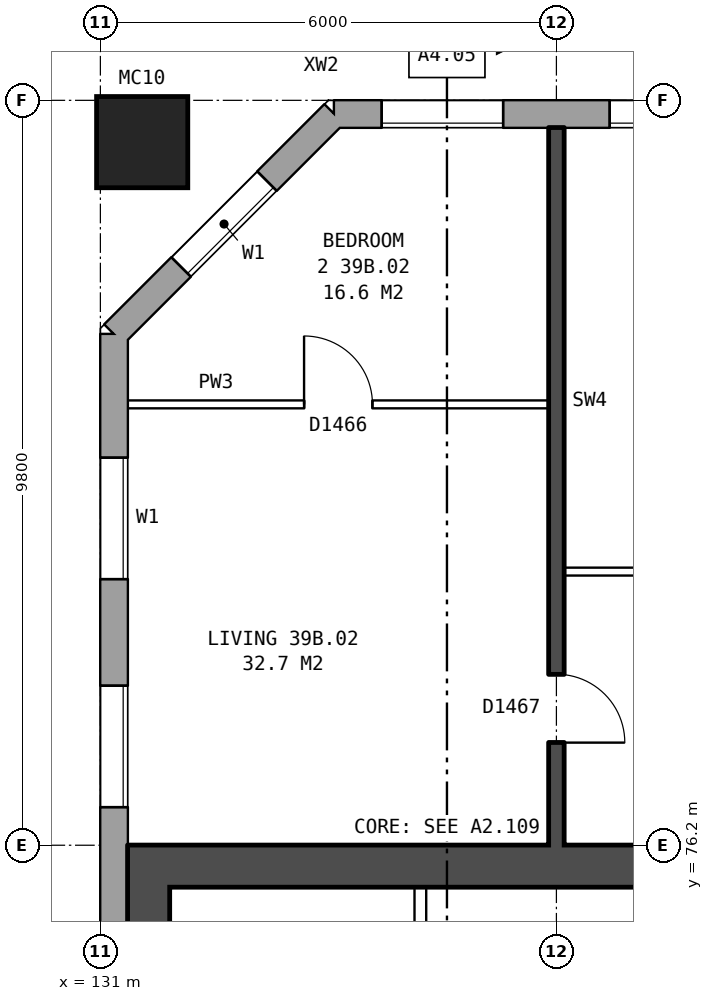
"""IFC4 building model, lengths in metres.
Left out: names, types, materials, properties, quantities, classifications, styles, units other than length and angle.
Written with IfcOpenShell. Run it as: python <this file> out.ifc"""

import sys

from ifc_helpers import new_model, si_unit, direction, frame, frame_2d, origin, origin_2d, place, context, subcontext, project, spatial, rectangle, hollow_rectangle, extrude, element, fill, save


model = new_model("IFC4")
c1 = context("Model", 3, precision=1e-05, world=origin(), true_north=direction((0.0, 1.0)))
c2 = subcontext(c1, "Body", "Model", "MODEL_VIEW")
j1 = project(units=[si_unit("LENGTHUNIT", "METRE"), si_unit("PLANEANGLEUNIT", "RADIAN")], contexts=[c1])
p1 = place(None, origin())
s1 = spatial("IfcSite", under=j1, at=p1, CompositionType="ELEMENT")
p2 = place(p1, origin())
s2 = spatial("IfcBuilding", under=s1, at=p2, CompositionType="ELEMENT")
p3 = place(p2, frame((0.0, 0.0, 139.2)))
s3 = spatial("IfcBuildingStorey", under=s2, at=p3, CompositionType="ELEMENT", Elevation=139.2)
p4 = place(p3, frame((131.55, 85.45, 0.0), z_axis=(0.0, 0.0, 1.0), x_axis=(1.0, 0.0, 0.0)))
e1 = element("IfcColumn", 1, at=p4, inside=s3, PredefinedType="COLUMN", context=c2, shape_type="SweptSolid", body=[
    extrude(hollow_rectangle(XDim=1.2, YDim=1.2, WallThickness=0.065, at=origin_2d()), origin(), (0.0, 0.0, 1.0), 3.1),
])
p5 = place(p3, frame((169.675, 85.82, 0.0), z_axis=(0.0, 0.0, 1.0), x_axis=(-1.0, 0.0, 0.0)))
e2 = element("IfcWall", 2, at=p5, inside=s3, PredefinedType="STANDARD", context=c2, shape_type="SweptSolid", body=[
    extrude(rectangle(XDim=35.601, YDim=0.36, at=frame_2d((17.8, 0.0))), origin(), (0.0, 0.0, 1.0), 2.85),
])
p6 = place(p5, frame((0.375, 0.0, 0.8)))
e3 = element("IfcOpeningElement", 3, at=p6, cuts=e2, PredefinedType="OPENING", context=c2, shape_type="SweptSolid", body=[
    extrude(rectangle(XDim=1.6, YDim=1.8, at=frame_2d((0.8, 0.9))), frame((0.0, 0.19, 0.0), z_axis=(0.0, -1.0, 0.0), x_axis=(1.0, 0.0, 0.0)), (0.0, 0.0, 1.0), 0.38),
])
p7 = place(p5, frame((3.375, 0.0, 0.8)))
e4 = element("IfcOpeningElement", 4, at=p7, cuts=e2, PredefinedType="OPENING", context=c2, shape_type="SweptSolid", body=[
    extrude(rectangle(XDim=1.6, YDim=1.8, at=frame_2d((0.8, 0.9))), frame((0.0, 0.19, 0.0), z_axis=(0.0, -1.0, 0.0), x_axis=(1.0, 0.0, 0.0)), (0.0, 0.0, 1.0), 0.38),
])
p8 = place(p5, frame((6.375, 0.0, 0.8)))
e5 = element("IfcOpeningElement", 5, at=p8, cuts=e2, PredefinedType="OPENING", context=c2, shape_type="SweptSolid", body=[
    extrude(rectangle(XDim=1.6, YDim=1.8, at=frame_2d((0.8, 0.9))), frame((0.0, 0.19, 0.0), z_axis=(0.0, -1.0, 0.0), x_axis=(1.0, 0.0, 0.0)), (0.0, 0.0, 1.0), 0.38),
])
p9 = place(p5, frame((9.375, 0.0, 0.8)))
e6 = element("IfcOpeningElement", 6, at=p9, cuts=e2, PredefinedType="OPENING", context=c2, shape_type="SweptSolid", body=[
    extrude(rectangle(XDim=1.6, YDim=1.8, at=frame_2d((0.8, 0.9))), frame((0.0, 0.19, 0.0), z_axis=(0.0, -1.0, 0.0), x_axis=(1.0, 0.0, 0.0)), (0.0, 0.0, 1.0), 0.38),
])
p10 = place(p5, frame((12.375, 0.0, 0.8)))
e7 = element("IfcOpeningElement", 7, at=p10, cuts=e2, PredefinedType="OPENING", context=c2, shape_type="SweptSolid", body=[
    extrude(rectangle(XDim=1.6, YDim=1.8, at=frame_2d((0.8, 0.9))), frame((0.0, 0.19, 0.0), z_axis=(0.0, -1.0, 0.0), x_axis=(1.0, 0.0, 0.0)), (0.0, 0.0, 1.0), 0.38),
])
p11 = place(p5, frame((14.875, 0.0, 1.65)))
e8 = element("IfcOpeningElement", 8, at=p11, cuts=e2, PredefinedType="OPENING", context=c2, shape_type="SweptSolid", body=[
    extrude(rectangle(XDim=1.4, YDim=0.9, at=frame_2d((0.7, 0.45))), frame((0.0, 0.19, 0.0), z_axis=(0.0, -1.0, 0.0), x_axis=(1.0, 0.0, 0.0)), (0.0, 0.0, 1.0), 0.38),
])
p12 = place(p5, frame((17.825, 0.0, 0.25)))
e9 = element("IfcOpeningElement", 9, at=p12, cuts=e2, PredefinedType="OPENING", context=c2, shape_type="SweptSolid", body=[
    extrude(rectangle(XDim=0.6, YDim=1.2, at=frame_2d((0.3, 0.6))), frame((0.0, 0.19, 0.0), z_axis=(0.0, -1.0, 0.0), x_axis=(1.0, 0.0, 0.0)), (0.0, 0.0, 1.0), 0.38),
])
p13 = place(p5, frame((21.375, 0.0, 0.8)))
e10 = element("IfcOpeningElement", 10, at=p13, cuts=e2, PredefinedType="OPENING", context=c2, shape_type="SweptSolid", body=[
    extrude(rectangle(XDim=1.6, YDim=1.8, at=frame_2d((0.8, 0.9))), frame((0.0, 0.19, 0.0), z_axis=(0.0, -1.0, 0.0), x_axis=(1.0, 0.0, 0.0)), (0.0, 0.0, 1.0), 0.38),
])
p14 = place(p5, frame((24.375, 0.0, 0.8)))
e11 = element("IfcOpeningElement", 11, at=p14, cuts=e2, PredefinedType="OPENING", context=c2, shape_type="SweptSolid", body=[
    extrude(rectangle(XDim=1.6, YDim=1.8, at=frame_2d((0.8, 0.9))), frame((0.0, 0.19, 0.0), z_axis=(0.0, -1.0, 0.0), x_axis=(1.0, 0.0, 0.0)), (0.0, 0.0, 1.0), 0.38),
])
p15 = place(p5, frame((27.375, 0.0, 0.8)))
e12 = element("IfcOpeningElement", 12, at=p15, cuts=e2, PredefinedType="OPENING", context=c2, shape_type="SweptSolid", body=[
    extrude(rectangle(XDim=1.6, YDim=1.8, at=frame_2d((0.8, 0.9))), frame((0.0, 0.19, 0.0), z_axis=(0.0, -1.0, 0.0), x_axis=(1.0, 0.0, 0.0)), (0.0, 0.0, 1.0), 0.38),
])
p16 = place(p5, frame((30.375, 0.0, 0.8)))
e13 = element("IfcOpeningElement", 13, at=p16, cuts=e2, PredefinedType="OPENING", context=c2, shape_type="SweptSolid", body=[
    extrude(rectangle(XDim=1.6, YDim=1.8, at=frame_2d((0.8, 0.9))), frame((0.0, 0.19, 0.0), z_axis=(0.0, -1.0, 0.0), x_axis=(1.0, 0.0, 0.0)), (0.0, 0.0, 1.0), 0.38),
])
p17 = place(p5, frame((33.375, 0.0, 0.8)))
e14 = element("IfcOpeningElement", 14, at=p17, cuts=e2, PredefinedType="OPENING", context=c2, shape_type="SweptSolid", body=[
    extrude(rectangle(XDim=1.6, YDim=1.8, at=frame_2d((0.8, 0.9))), frame((0.0, 0.19, 0.0), z_axis=(0.0, -1.0, 0.0), x_axis=(1.0, 0.0, 0.0)), (0.0, 0.0, 1.0), 0.38),
])
p18 = place(p5, frame((16.825, 0.0, 0.15)))
e15 = element("IfcOpeningElement", 15, at=p18, cuts=e2, PredefinedType="OPENING", context=c2, shape_type="SweptSolid", body=[
    extrude(rectangle(XDim=0.6, YDim=0.9, at=frame_2d((0.3, 0.45))), frame((0.0, 0.19, 0.0), z_axis=(0.0, -1.0, 0.0), x_axis=(1.0, 0.0, 0.0)), (0.0, 0.0, 1.0), 0.38),
])
p19 = place(p5, frame((19.575, 0.0, 1.35)))
e16 = element("IfcOpeningElement", 16, at=p19, cuts=e2, PredefinedType="OPENING", context=c2, shape_type="SweptSolid", body=[
    extrude(rectangle(XDim=0.8, YDim=1.2, at=frame_2d((0.4, 0.6))), frame((0.0, 0.19, 0.0), z_axis=(0.0, -1.0, 0.0), x_axis=(1.0, 0.0, 0.0)), (0.0, 0.0, 1.0), 0.38),
])
p20 = place(p3, frame((134.075, 85.82, 0.0), z_axis=(0.0, 0.0, 1.0), x_axis=(-0.707106781187, -0.707106781187, 0.0)))
e17 = element("IfcWall", 17, at=p20, inside=s3, PredefinedType="STANDARD", context=c2, shape_type="SweptSolid", body=[
    extrude(rectangle(XDim=4.094, YDim=0.36, at=frame_2d((2.047, 0.0))), origin(), (0.0, 0.0, 1.0), 2.85),
])
p21 = place(p20, frame((1.247, 0.0, 0.8)))
e18 = element("IfcOpeningElement", 18, at=p21, cuts=e17, PredefinedType="OPENING", context=c2, shape_type="SweptSolid", body=[
    extrude(rectangle(XDim=1.6, YDim=1.8, at=frame_2d((0.8, 0.9))), frame((0.0, 0.19, 0.0), z_axis=(0.0, -1.0, 0.0), x_axis=(1.0, 0.0, 0.0)), (0.0, 0.0, 1.0), 0.38),
])
p22 = place(p3, frame((131.18, 82.925, 0.0), z_axis=(0.0, 0.0, 1.0), x_axis=(0.0, -1.0, 0.0)))
e19 = element("IfcWall", 19, at=p22, inside=s3, PredefinedType="STANDARD", context=c2, shape_type="SweptSolid", body=[
    extrude(rectangle(XDim=25.851, YDim=0.36, at=frame_2d((12.925, 0.0))), origin(), (0.0, 0.0, 1.0), 2.85),
])
p23 = place(p22, frame((1.625, 0.0, 0.8)))
e20 = element("IfcOpeningElement", 20, at=p23, cuts=e19, PredefinedType="OPENING", context=c2, shape_type="SweptSolid", body=[
    extrude(rectangle(XDim=1.6, YDim=1.8, at=frame_2d((0.8, 0.9))), frame((0.0, 0.19, 0.0), z_axis=(0.0, -1.0, 0.0), x_axis=(1.0, 0.0, 0.0)), (0.0, 0.0, 1.0), 0.38),
])
p24 = place(p22, frame((4.625, 0.0, 0.8)))
e21 = element("IfcOpeningElement", 21, at=p24, cuts=e19, PredefinedType="OPENING", context=c2, shape_type="SweptSolid", body=[
    extrude(rectangle(XDim=1.6, YDim=1.8, at=frame_2d((0.8, 0.9))), frame((0.0, 0.19, 0.0), z_axis=(0.0, -1.0, 0.0), x_axis=(1.0, 0.0, 0.0)), (0.0, 0.0, 1.0), 0.38),
])
p25 = place(p22, frame((19.625, 0.0, 0.8)))
e22 = element("IfcOpeningElement", 22, at=p25, cuts=e19, PredefinedType="OPENING", context=c2, shape_type="SweptSolid", body=[
    extrude(rectangle(XDim=1.6, YDim=1.8, at=frame_2d((0.8, 0.9))), frame((0.0, 0.19, 0.0), z_axis=(0.0, -1.0, 0.0), x_axis=(1.0, 0.0, 0.0)), (0.0, 0.0, 1.0), 0.38),
])
p26 = place(p22, frame((22.625, 0.0, 0.8)))
e23 = element("IfcOpeningElement", 23, at=p26, cuts=e19, PredefinedType="OPENING", context=c2, shape_type="SweptSolid", body=[
    extrude(rectangle(XDim=1.6, YDim=1.8, at=frame_2d((0.8, 0.9))), frame((0.0, 0.19, 0.0), z_axis=(0.0, -1.0, 0.0), x_axis=(1.0, 0.0, 0.0)), (0.0, 0.0, 1.0), 0.38),
])
p27 = place(p3, frame((131.635, 63.8, 0.0), z_axis=(0.0, 0.0, 1.0), x_axis=(0.0, 1.0, 0.0)))
e24 = element("IfcWall", 24, at=p27, inside=s3, PredefinedType="SHEAR", context=c2, shape_type="SweptSolid", body=[
    extrude(rectangle(XDim=12.4, YDim=0.55, at=frame_2d((6.2, 0.0))), origin(), (0.0, 0.0, 1.0), 2.85),
])
p28 = place(p3, frame((139.21, 75.925, 0.0), z_axis=(0.0, 0.0, 1.0), x_axis=(-1.0, 0.0, 0.0)))
e25 = element("IfcWall", 25, at=p28, inside=s3, PredefinedType="SHEAR", context=c2, shape_type="SweptSolid", body=[
    extrude(rectangle(XDim=7.3, YDim=0.55, at=frame_2d((3.65, 0.0))), origin(), (0.0, 0.0, 1.0), 2.85),
])
p29 = place(p3, frame((135.21, 71.375, 0.0), z_axis=(0.0, 0.0, 1.0), x_axis=(0.0, 1.0, 0.0)))
e26 = element("IfcWall", 26, at=p29, inside=s3, PredefinedType="PARTITIONING", context=c2, shape_type="SweptSolid", body=[
    extrude(rectangle(XDim=4.275, YDim=0.15, at=frame_2d((2.137, 0.0))), origin(), (0.0, 0.0, 1.0), 2.85),
])
p30 = place(p29, frame((2.625, 0.0, 0.0)))
e27 = element("IfcOpeningElement", 27, at=p30, cuts=e26, PredefinedType="OPENING", context=c2, shape_type="SweptSolid", body=[
    extrude(rectangle(XDim=1.1, YDim=2.1, at=frame_2d((0.55, 1.05))), frame((0.0, 0.085, 0.0), z_axis=(0.0, -1.0, 0.0), x_axis=(1.0, 0.0, 0.0)), (0.0, 0.0, 1.0), 0.17),
])
p31 = place(p3, frame((137.1, 79.8, 0.0), z_axis=(0.0, 0.0, 1.0), x_axis=(1.0, 0.0, 0.0)))
e28 = element("IfcWall", 28, at=p31, inside=s3, PredefinedType="PARTITIONING", context=c2, shape_type="SweptSolid", body=[
    extrude(rectangle(XDim=5.8, YDim=0.1, at=frame_2d((2.9, 0.0))), origin(), (0.0, 0.0, 1.0), 2.85),
])
p32 = place(p31, frame((1.3, 0.0, 0.0)))
e29 = element("IfcOpeningElement", 29, at=p32, cuts=e28, PredefinedType="OPENING", context=c2, shape_type="SweptSolid", body=[
    extrude(rectangle(XDim=0.9, YDim=2.1, at=frame_2d((0.45, 1.05))), frame((0.0, 0.06, 0.0), z_axis=(0.0, -1.0, 0.0), x_axis=(1.0, 0.0, 0.0)), (0.0, 0.0, 1.0), 0.12),
])
p33 = place(p31, frame((4.2, 0.0, 0.0)))
e30 = element("IfcOpeningElement", 30, at=p33, cuts=e28, PredefinedType="OPENING", context=c2, shape_type="SweptSolid", body=[
    extrude(rectangle(XDim=0.9, YDim=2.1, at=frame_2d((0.45, 1.05))), frame((0.0, 0.06, 0.0), z_axis=(0.0, -1.0, 0.0), x_axis=(1.0, 0.0, 0.0)), (0.0, 0.0, 1.0), 0.12),
])
p34 = place(p3, frame((131.36, 82.0, 0.0), z_axis=(0.0, 0.0, 1.0), x_axis=(1.0, 0.0, 0.0)))
e31 = element("IfcWall", 31, at=p34, inside=s3, PredefinedType="PARTITIONING", context=c2, shape_type="SweptSolid", body=[
    extrude(rectangle(XDim=5.54, YDim=0.1, at=frame_2d((2.77, 0.0))), origin(), (0.0, 0.0, 1.0), 2.85),
])
p35 = place(p34, frame((2.32, 0.0, 0.0)))
e32 = element("IfcOpeningElement", 32, at=p35, cuts=e31, PredefinedType="OPENING", context=c2, shape_type="SweptSolid", body=[
    extrude(rectangle(XDim=0.9, YDim=2.1, at=frame_2d((0.45, 1.05))), frame((0.0, 0.06, 0.0), z_axis=(0.0, -1.0, 0.0), x_axis=(1.0, 0.0, 0.0)), (0.0, 0.0, 1.0), 0.12),
])
p36 = place(p3, frame((137.0, 76.2, 0.0), z_axis=(0.0, 0.0, 1.0), x_axis=(0.0, 1.0, 0.0)))
e33 = element("IfcWall", 33, at=p36, inside=s3, PredefinedType="SOLIDWALL", context=c2, shape_type="SweptSolid", body=[
    extrude(rectangle(XDim=9.44, YDim=0.2, at=frame_2d((4.72, 0.0))), origin(), (0.0, 0.0, 1.0), 2.85),
])
p37 = place(p36, frame((1.35, 0.0, 0.0)))
e34 = element("IfcOpeningElement", 34, at=p37, cuts=e33, PredefinedType="OPENING", context=c2, shape_type="SweptSolid", body=[
    extrude(rectangle(XDim=0.9, YDim=2.1, at=frame_2d((0.45, 1.05))), frame((0.0, 0.11, 0.0), z_axis=(0.0, -1.0, 0.0), x_axis=(1.0, 0.0, 0.0)), (0.0, 0.0, 1.0), 0.22),
])
p38 = place(p16, origin())
e35 = element("IfcWindow", 35, at=p38, inside=s3, PartitioningType="SINGLE_PANEL", PredefinedType="WINDOW", context=c2, shape_type="SweptSolid", body=[
    extrude(rectangle(XDim=1.6, YDim=1.8, at=frame_2d((0.8, 0.9))), frame((0.0, 0.15, 0.0), z_axis=(0.0, -1.0, 0.0), x_axis=(1.0, 0.0, 0.0)), (0.0, 0.0, 1.0), 0.06),
])
fill(e13, e35)
p39 = place(p17, origin())
e36 = element("IfcWindow", 36, at=p39, inside=s3, PartitioningType="SINGLE_PANEL", PredefinedType="WINDOW", context=c2, shape_type="SweptSolid", body=[
    extrude(rectangle(XDim=1.6, YDim=1.8, at=frame_2d((0.8, 0.9))), frame((0.0, 0.15, 0.0), z_axis=(0.0, -1.0, 0.0), x_axis=(1.0, 0.0, 0.0)), (0.0, 0.0, 1.0), 0.06),
])
fill(e14, e36)
p40 = place(p21, origin())
e37 = element("IfcWindow", 37, at=p40, inside=s3, PartitioningType="SINGLE_PANEL", PredefinedType="WINDOW", context=c2, shape_type="SweptSolid", body=[
    extrude(rectangle(XDim=1.6, YDim=1.8, at=frame_2d((0.8, 0.9))), frame((0.0, 0.15, 0.0), z_axis=(0.0, -1.0, 0.0), x_axis=(1.0, 0.0, 0.0)), (0.0, 0.0, 1.0), 0.06),
])
fill(e18, e37)
p41 = place(p23, origin())
e38 = element("IfcWindow", 38, at=p41, inside=s3, PartitioningType="SINGLE_PANEL", PredefinedType="WINDOW", context=c2, shape_type="SweptSolid", body=[
    extrude(rectangle(XDim=1.6, YDim=1.8, at=frame_2d((0.8, 0.9))), frame((0.0, 0.15, 0.0), z_axis=(0.0, -1.0, 0.0), x_axis=(1.0, 0.0, 0.0)), (0.0, 0.0, 1.0), 0.06),
])
fill(e20, e38)
p42 = place(p24, origin())
e39 = element("IfcWindow", 39, at=p42, inside=s3, PartitioningType="SINGLE_PANEL", PredefinedType="WINDOW", context=c2, shape_type="SweptSolid", body=[
    extrude(rectangle(XDim=1.6, YDim=1.8, at=frame_2d((0.8, 0.9))), frame((0.0, 0.15, 0.0), z_axis=(0.0, -1.0, 0.0), x_axis=(1.0, 0.0, 0.0)), (0.0, 0.0, 1.0), 0.06),
])
fill(e21, e39)
p43 = place(p35, origin())
e40 = element("IfcDoor", 40, at=p43, inside=s3, OperationType="SINGLE_SWING_LEFT", PredefinedType="DOOR", context=c2, shape_type="SweptSolid", body=[
    extrude(rectangle(XDim=0.9, YDim=2.1, at=frame_2d((0.45, 1.05))), frame((0.0, 0.025, 0.0), z_axis=(0.0, -1.0, 0.0), x_axis=(1.0, 0.0, 0.0)), (0.0, 0.0, 1.0), 0.05),
])
fill(e32, e40)
p44 = place(p37, frame((0.9, 0.0, 0.0), z_axis=(0.0, 0.0, 1.0), x_axis=(-1.0, 0.0, 0.0)))
e41 = element("IfcDoor", 41, at=p44, inside=s3, OperationType="SINGLE_SWING_RIGHT", PredefinedType="DOOR", context=c2, shape_type="SweptSolid", body=[
    extrude(rectangle(XDim=0.9, YDim=2.1, at=frame_2d((0.45, 1.05))), frame((0.0, 0.025, 0.0), z_axis=(0.0, -1.0, 0.0), x_axis=(1.0, 0.0, 0.0)), (0.0, 0.0, 1.0), 0.05),
])
fill(e34, e41)
save(model, sys.argv[1])
